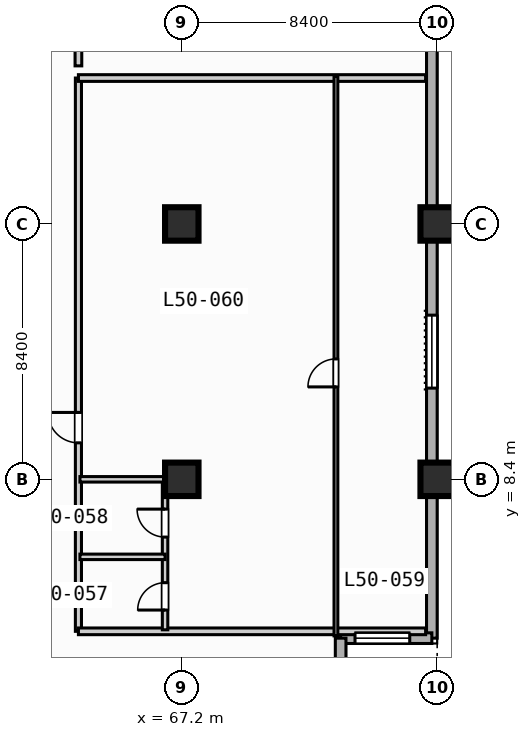
"""IFC4 building model, lengths in metres.
Left out: names, types, materials, properties, quantities, classifications, styles, units other than length and angle.
Written with IfcOpenShell. Run it as: python <this file> out.ifc"""

import sys

from ifc_helpers import new_model, si_unit, direction, frame, frame_2d, origin, origin_2d, place, context, subcontext, project, spatial, rectangle, extrude, element, fill, save


model = new_model("IFC4")
c1 = context("Model", 3, precision=1e-05, world=origin(), true_north=direction((0.0, 1.0)))
c2 = subcontext(c1, "Body", "Model", "MODEL_VIEW")
j1 = project(units=[si_unit("LENGTHUNIT", "METRE"), si_unit("PLANEANGLEUNIT", "RADIAN")], contexts=[c1])
p1 = place(None, origin())
s1 = spatial("IfcSite", under=j1, at=p1, CompositionType="ELEMENT")
p2 = place(p1, origin())
s2 = spatial("IfcBuilding", under=s1, at=p2, CompositionType="ELEMENT")
p3 = place(p2, frame((0.0, 0.0, 205.0)))
s3 = spatial("IfcBuildingStorey", under=s2, at=p3, CompositionType="ELEMENT", Elevation=205.0)
for number, where, z_axis, x_axis in (
    (1, (67.2, 8.4, 0.0), (0.0, 0.0, 1.0), (1.0, 0.0, 0.0)),
    (2, (67.2, 16.8, 0.0), (0.0, 0.0, 1.0), (1.0, 0.0, 0.0)),
    (3, (75.6, 8.4, 0.0), (0.0, 0.0, 1.0), (1.0, 0.0, 0.0)),
    (4, (75.6, 16.8, 0.0), (0.0, 0.0, 1.0), (1.0, 0.0, 0.0)),
):
    element("IfcColumn", number, at=place(p3, frame(where, z_axis=z_axis, x_axis=x_axis)), inside=s3, PredefinedType="COLUMN", context=c2, shape_type="SweptSolid", body=[
        extrude(rectangle(XDim=1.1, YDim=1.1, at=origin_2d()), origin(), (0.0, 0.0, 1.0), 3.7),
    ])
p4 = place(p3, frame((75.425, 30.425, 0.0), z_axis=(0.0, 0.0, 1.0), x_axis=(0.0, -1.0, 0.0)))
e5 = element("IfcWall", 5, at=p4, inside=s3, PredefinedType="STANDARD", context=c2, shape_type="SweptSolid", body=[
    extrude(rectangle(XDim=27.25, YDim=0.35, at=frame_2d((13.625, 0.0))), origin(), (0.0, 0.0, 1.0), 3.47),
])
p5 = place(p4, frame((16.625, 0.0, 0.85)))
e6 = element("IfcOpeningElement", 6, at=p5, cuts=e5, PredefinedType="OPENING", context=c2, shape_type="SweptSolid", body=[
    extrude(rectangle(XDim=2.4, YDim=1.95, at=frame_2d((1.2, 0.975))), frame((0.0, 0.185, 0.0), z_axis=(0.0, -1.0, 0.0), x_axis=(1.0, 0.0, 0.0)), (0.0, 0.0, 1.0), 0.37),
])
p6 = place(p3, frame((75.425, 3.175, 0.0), z_axis=(0.0, 0.0, 1.0), x_axis=(-1.0, 0.0, 0.0)))
e7 = element("IfcWall", 7, at=p6, inside=s3, PredefinedType="STANDARD", context=c2, shape_type="SweptSolid", body=[
    extrude(rectangle(XDim=3.0, YDim=0.35, at=frame_2d((1.5, 0.0))), origin(), (0.0, 0.0, 1.0), 3.47),
])
p7 = place(p6, frame((0.728, 0.0, 0.85)))
e8 = element("IfcOpeningElement", 8, at=p7, cuts=e7, PredefinedType="OPENING", context=c2, shape_type="SweptSolid", body=[
    extrude(rectangle(XDim=1.8, YDim=1.8, at=frame_2d((0.9, 0.9))), frame((0.0, 0.185, 0.0), z_axis=(0.0, -1.0, 0.0), x_axis=(1.0, 0.0, 0.0)), (0.0, 0.0, 1.0), 0.37),
])
p8 = place(p3, frame((72.425, 3.175, 0.0), z_axis=(0.0, 0.0, 1.0), x_axis=(0.0, -1.0, 0.0)))
e9 = element("IfcWall", 9, at=p8, inside=s3, PredefinedType="STANDARD", context=c2, shape_type="SweptSolid", body=[
    extrude(rectangle(XDim=3.0, YDim=0.35, at=frame_2d((1.5, 0.0))), origin(), (0.0, 0.0, 1.0), 3.47),
])
p9 = place(p3, frame((63.8, 3.4, 0.0), z_axis=(0.0, 0.0, 1.0), x_axis=(0.0, 1.0, 0.0)))
e10 = element("IfcWall", 10, at=p9, inside=s3, PredefinedType="PARTITIONING", context=c2, shape_type="SweptSolid", body=[
    extrude(rectangle(XDim=18.2, YDim=0.2, at=frame_2d((9.1, 0.0))), origin(), (0.0, 0.0, 1.0), 3.47),
])
p10 = place(p9, frame((6.2, 0.0, 0.0)))
e11 = element("IfcOpeningElement", 11, at=p10, cuts=e10, PredefinedType="OPENING", context=c2, shape_type="SweptSolid", body=[
    extrude(rectangle(XDim=1.0, YDim=2.15, at=frame_2d((0.5, 1.075))), frame((0.0, 0.11, 0.0), z_axis=(0.0, -1.0, 0.0), x_axis=(1.0, 0.0, 0.0)), (0.0, 0.0, 1.0), 0.22),
])
for number, where, z_axis, x_axis in (
    (12, (63.8, 3.4, 0.0), (0.0, 0.0, 1.0), (1.0, 0.0, 0.0)),
    (13, (63.8, 21.6, 0.0), (0.0, 0.0, 1.0), (1.0, 0.0, 0.0)),
):
    element("IfcWall", number, at=place(p3, frame(where, z_axis=z_axis, x_axis=x_axis)), inside=s3, PredefinedType="PARTITIONING", context=c2, shape_type="SweptSolid", body=[
        extrude(rectangle(XDim=11.42, YDim=0.22, at=frame_2d((5.71, 0.0))), origin(), (0.0, 0.0, 1.0), 3.47),
    ])
p11 = place(p3, frame((66.65, 3.45, 0.0), z_axis=(0.0, 0.0, 1.0), x_axis=(0.0, 1.0, 0.0)))
e14 = element("IfcWall", 14, at=p11, inside=s3, PredefinedType="PLUMBINGWALL", context=c2, shape_type="SweptSolid", body=[
    extrude(rectangle(XDim=4.95, YDim=0.18, at=frame_2d((2.475, 0.0))), origin(), (0.0, 0.0, 1.0), 3.47),
])
p12 = place(p11, frame((0.65, 0.0, 0.0)))
e15 = element("IfcOpeningElement", 15, at=p12, cuts=e14, PredefinedType="OPENING", context=c2, shape_type="SweptSolid", body=[
    extrude(rectangle(XDim=0.9, YDim=2.1, at=frame_2d((0.45, 1.05))), frame((0.0, 0.1, 0.0), z_axis=(0.0, -1.0, 0.0), x_axis=(1.0, 0.0, 0.0)), (0.0, 0.0, 1.0), 0.2),
])
p13 = place(p11, frame((3.05, 0.0, 0.0)))
e16 = element("IfcOpeningElement", 16, at=p13, cuts=e14, PredefinedType="OPENING", context=c2, shape_type="SweptSolid", body=[
    extrude(rectangle(XDim=0.92, YDim=2.1, at=frame_2d((0.46, 1.05))), frame((0.0, 0.1, 0.0), z_axis=(0.0, -1.0, 0.0), x_axis=(1.0, 0.0, 0.0)), (0.0, 0.0, 1.0), 0.2),
])
p14 = place(p3, frame((63.85, 5.85, 0.0), z_axis=(0.0, 0.0, 1.0), x_axis=(1.0, 0.0, 0.0)))
e17 = element("IfcWall", 17, at=p14, inside=s3, PredefinedType="PLUMBINGWALL", context=c2, shape_type="SweptSolid", body=[
    extrude(rectangle(XDim=2.8, YDim=0.18, at=frame_2d((1.4, 0.0))), origin(), (0.0, 0.0, 1.0), 3.47),
])
p15 = place(p3, frame((63.85, 8.4, 0.0), z_axis=(0.0, 0.0, 1.0), x_axis=(1.0, 0.0, 0.0)))
e18 = element("IfcWall", 18, at=p15, inside=s3, PredefinedType="PLUMBINGWALL", context=c2, shape_type="SweptSolid", body=[
    extrude(rectangle(XDim=2.8, YDim=0.18, at=frame_2d((1.4, 0.0))), origin(), (0.0, 0.0, 1.0), 2.82),
])
p16 = place(p3, frame((72.27, 3.25, 0.0), z_axis=(0.0, 0.0, 1.0), x_axis=(0.0, 1.0, 0.0)))
e19 = element("IfcWall", 19, at=p16, inside=s3, PredefinedType="PARTITIONING", context=c2, shape_type="SweptSolid", body=[
    extrude(rectangle(XDim=18.4, YDim=0.125, at=frame_2d((9.2, 0.0))), origin(), (0.0, 0.0, 1.0), 3.47),
])
p17 = place(p16, frame((8.19, 0.0, 0.0)))
e20 = element("IfcOpeningElement", 20, at=p17, cuts=e19, PredefinedType="OPENING", context=c2, shape_type="SweptSolid", body=[
    extrude(rectangle(XDim=0.92, YDim=2.1, at=frame_2d((0.46, 1.05))), frame((0.0, 0.073, 0.0), z_axis=(0.0, -1.0, 0.0), x_axis=(1.0, 0.0, 0.0)), (0.0, 0.0, 1.0), 0.145),
])
p18 = place(p3, frame((63.8, 22.0, 0.0), z_axis=(0.0, 0.0, 1.0), x_axis=(0.0, 1.0, 0.0)))
e21 = element("IfcWall", 21, at=p18, inside=s3, PredefinedType="PARTITIONING", context=c2, shape_type="SweptSolid", body=[
    extrude(rectangle(XDim=6.0, YDim=0.22, at=frame_2d((3.0, 0.0))), origin(), (0.0, 0.0, 1.0), 3.47),
])
p19 = place(p5, origin())
e22 = element("IfcWindow", 22, at=p19, inside=s3, PartitioningType="SINGLE_PANEL", PredefinedType="WINDOW", context=c2, shape_type="SweptSolid", body=[
    extrude(rectangle(XDim=2.4, YDim=1.95, at=frame_2d((1.2, 0.975))), frame((0.0, 0.03, 0.0), z_axis=(0.0, -1.0, 0.0), x_axis=(1.0, 0.0, 0.0)), (0.0, 0.0, 1.0), 0.06),
])
fill(e6, e22)
p20 = place(p7, origin())
e23 = element("IfcWindow", 23, at=p20, inside=s3, PartitioningType="SINGLE_PANEL", PredefinedType="WINDOW", context=c2, shape_type="SweptSolid", body=[
    extrude(rectangle(XDim=1.8, YDim=1.8, at=frame_2d((0.9, 0.9))), frame((0.0, 0.03, 0.0), z_axis=(0.0, -1.0, 0.0), x_axis=(1.0, 0.0, 0.0)), (0.0, 0.0, 1.0), 0.06),
])
fill(e8, e23)
p21 = place(p10, origin())
e24 = element("IfcDoor", 24, at=p21, inside=s3, OperationType="SINGLE_SWING_RIGHT", PredefinedType="DOOR", context=c2, shape_type="SweptSolid", body=[
    extrude(rectangle(XDim=1.0, YDim=2.15, at=frame_2d((0.5, 1.075))), frame((0.0, 0.025, 0.0), z_axis=(0.0, -1.0, 0.0), x_axis=(1.0, 0.0, 0.0)), (0.0, 0.0, 1.0), 0.05),
])
fill(e11, e24)
p22 = place(p12, origin())
e25 = element("IfcDoor", 25, at=p22, inside=s3, OperationType="SINGLE_SWING_LEFT", PredefinedType="DOOR", context=c2, shape_type="SweptSolid", body=[
    extrude(rectangle(XDim=0.9, YDim=2.1, at=frame_2d((0.45, 1.05))), frame((0.0, 0.025, 0.0), z_axis=(0.0, -1.0, 0.0), x_axis=(1.0, 0.0, 0.0)), (0.0, 0.0, 1.0), 0.05),
])
fill(e15, e25)
p23 = place(p13, origin())
e26 = element("IfcDoor", 26, at=p23, inside=s3, OperationType="SINGLE_SWING_RIGHT", PredefinedType="DOOR", context=c2, shape_type="SweptSolid", body=[
    extrude(rectangle(XDim=0.92, YDim=2.1, at=frame_2d((0.46, 1.05))), frame((0.0, 0.025, 0.0), z_axis=(0.0, -1.0, 0.0), x_axis=(1.0, 0.0, 0.0)), (0.0, 0.0, 1.0), 0.05),
])
fill(e16, e26)
p24 = place(p17, origin())
e27 = element("IfcDoor", 27, at=p24, inside=s3, OperationType="SINGLE_SWING_LEFT", PredefinedType="DOOR", context=c2, shape_type="SweptSolid", body=[
    extrude(rectangle(XDim=0.92, YDim=2.1, at=frame_2d((0.46, 1.05))), frame((0.0, 0.025, 0.0), z_axis=(0.0, -1.0, 0.0), x_axis=(1.0, 0.0, 0.0)), (0.0, 0.0, 1.0), 0.05),
])
fill(e20, e27)
save(model, sys.argv[1])
